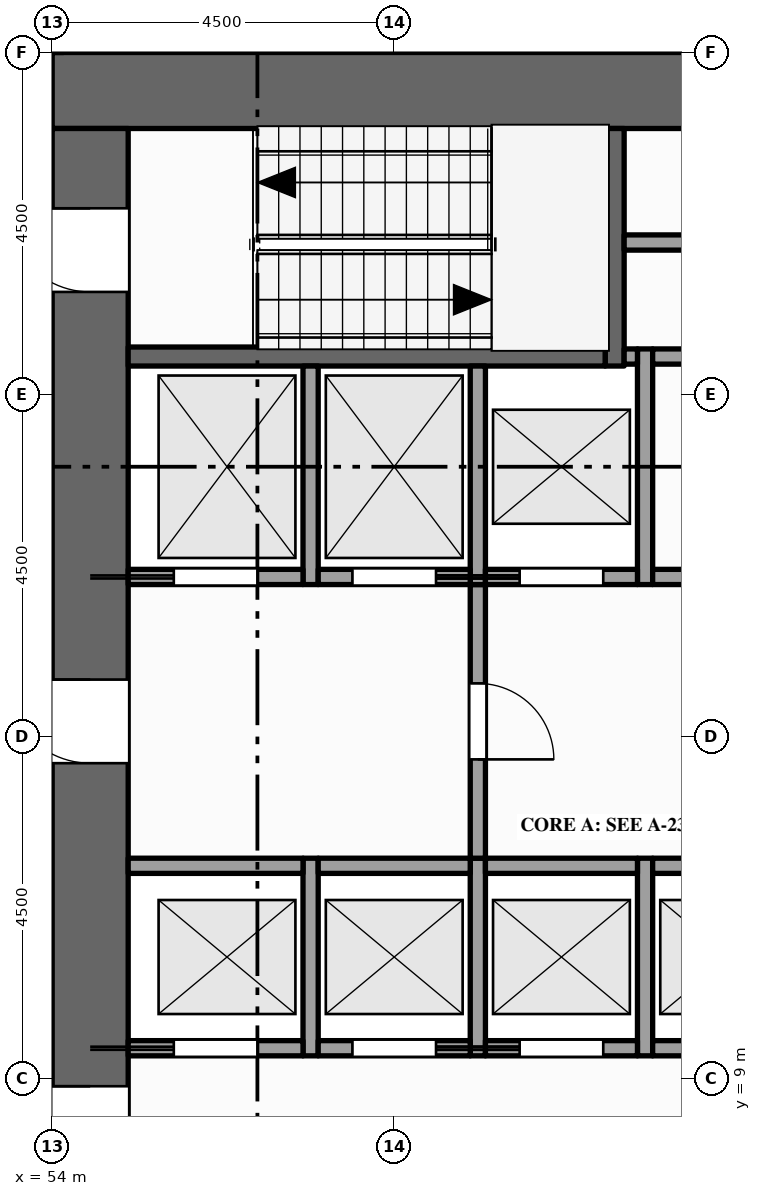
"""IFC4 building model, lengths in metres.
Left out: names, types, materials, properties, quantities, classifications, styles, units other than length and angle.
Written with IfcOpenShell. Run it as: python <this file> out.ifc"""

import sys

from ifc_helpers import new_model, si_unit, direction, frame, frame_2d, origin, place, context, subcontext, project, spatial, rectangle, extrude, element, fill, save


model = new_model("IFC4")
c1 = context("Model", 3, precision=1e-05, world=origin(), true_north=direction((0.0, 1.0)))
c2 = subcontext(c1, "Body", "Model", "MODEL_VIEW")
j1 = project(units=[si_unit("LENGTHUNIT", "METRE"), si_unit("PLANEANGLEUNIT", "RADIAN")], contexts=[c1])
p1 = place(None, origin())
s1 = spatial("IfcSite", under=j1, at=p1, CompositionType="ELEMENT")
p2 = place(p1, origin())
s2 = spatial("IfcBuilding", under=s1, at=p2, CompositionType="ELEMENT")
p3 = place(p2, frame((0.0, 0.0, 179.0)))
s3 = spatial("IfcBuildingStorey", under=s2, at=p3, CompositionType="ELEMENT", Elevation=179.0)
p4 = place(p3, frame((54.0, 22.0, -0.15), z_axis=(0.0, 0.0, 1.0), x_axis=(1.0, 0.0, 0.0)))
e1 = element("IfcWall", 1, at=p4, inside=s3, PredefinedType="SHEAR", context=c2, shape_type="SweptSolid", body=[
    extrude(rectangle(XDim=13.5, YDim=1.0, at=frame_2d((6.75, 0.0))), origin(), (0.0, 0.0, 1.0), 4.0),
])
p5 = place(p3, frame((54.5, 1.0, -0.15), z_axis=(0.0, 0.0, 1.0), x_axis=(0.0, 1.0, 0.0)))
e2 = element("IfcWall", 2, at=p5, inside=s3, PredefinedType="SHEAR", context=c2, shape_type="SweptSolid", body=[
    extrude(rectangle(XDim=20.5, YDim=1.0, at=frame_2d((10.25, 0.0))), origin(), (0.0, 0.0, 1.0), 4.0),
])
p6 = place(p5, frame((6.1, 0.0, 0.15)))
e3 = element("IfcOpeningElement", 3, at=p6, cuts=e2, PredefinedType="OPENING", context=c2, shape_type="SweptSolid", body=[
    extrude(rectangle(XDim=1.8, YDim=2.1, at=frame_2d((0.9, 1.05))), frame((0.0, 0.51, 0.0), z_axis=(0.0, -1.0, 0.0), x_axis=(1.0, 0.0, 0.0)), (0.0, 0.0, 1.0), 1.02),
])
p7 = place(p5, frame((12.15, 0.0, 0.15)))
e4 = element("IfcOpeningElement", 4, at=p7, cuts=e2, PredefinedType="OPENING", context=c2, shape_type="SweptSolid", body=[
    extrude(rectangle(XDim=1.1, YDim=2.1, at=frame_2d((0.55, 1.05))), frame((0.0, 0.51, 0.0), z_axis=(0.0, -1.0, 0.0), x_axis=(1.0, 0.0, 0.0)), (0.0, 0.0, 1.0), 1.02),
])
p8 = place(p5, frame((1.15, 0.0, 0.15)))
e5 = element("IfcOpeningElement", 5, at=p8, cuts=e2, PredefinedType="OPENING", context=c2, shape_type="SweptSolid", body=[
    extrude(rectangle(XDim=1.1, YDim=2.1, at=frame_2d((0.55, 1.05))), frame((0.0, 0.51, 0.0), z_axis=(0.0, -1.0, 0.0), x_axis=(1.0, 0.0, 0.0)), (0.0, 0.0, 1.0), 1.02),
])
p9 = place(p5, frame((18.35, 0.0, 0.15)))
e6 = element("IfcOpeningElement", 6, at=p9, cuts=e2, PredefinedType="OPENING", context=c2, shape_type="SweptSolid", body=[
    extrude(rectangle(XDim=1.1, YDim=2.1, at=frame_2d((0.55, 1.05))), frame((0.0, 0.51, 0.0), z_axis=(0.0, -1.0, 0.0), x_axis=(1.0, 0.0, 0.0)), (0.0, 0.0, 1.0), 1.02),
])
p10 = place(p3, frame((54.0, 22.5, 0.0), z_axis=(0.0, 0.0, 1.0), x_axis=(0.0, 1.0, 0.0)))
e7 = element("IfcWall", 7, at=p10, inside=s3, PredefinedType="STANDARD", context=c2, shape_type="SweptSolid", body=[
    extrude(rectangle(XDim=1.05, YDim=0.3, at=frame_2d((0.525, 0.0))), origin(), (0.0, 0.0, 1.0), 3.149),
])
p11 = place(p3, frame((57.4, 9.3, 0.0), z_axis=(0.0, 0.0, 1.0), x_axis=(0.0, 1.0, 0.0)))
e8 = element("IfcWall", 8, at=p11, inside=s3, PredefinedType="SOLIDWALL", context=c2, shape_type="SweptSolid", body=[
    extrude(rectangle(XDim=2.6, YDim=0.2, at=frame_2d((1.3, 0.0))), origin(), (0.0, 0.0, 1.0), 3.85),
])
p12 = place(p3, frame((57.4, 15.5, 0.0), z_axis=(0.0, 0.0, 1.0), x_axis=(0.0, 1.0, 0.0)))
e9 = element("IfcWall", 9, at=p12, inside=s3, PredefinedType="SOLIDWALL", context=c2, shape_type="SweptSolid", body=[
    extrude(rectangle(XDim=2.875, YDim=0.2, at=frame_2d((1.438, 0.0))), origin(), (0.0, 0.0, 1.0), 3.85),
])
p13 = place(p3, frame((59.6, 9.3, 0.0), z_axis=(0.0, 0.0, 1.0), x_axis=(0.0, 1.0, 0.0)))
e10 = element("IfcWall", 10, at=p13, inside=s3, PredefinedType="SOLIDWALL", context=c2, shape_type="SweptSolid", body=[
    extrude(rectangle(XDim=2.6, YDim=0.2, at=frame_2d((1.3, 0.0))), origin(), (0.0, 0.0, 1.0), 3.85),
])
p14 = place(p3, frame((59.6, 11.9, 0.0), z_axis=(0.0, 0.0, 1.0), x_axis=(0.0, 1.0, 0.0)))
e11 = element("IfcWall", 11, at=p14, inside=s3, PredefinedType="PARTITIONING", context=c2, shape_type="SweptSolid", body=[
    extrude(rectangle(XDim=3.6, YDim=0.2, at=frame_2d((1.8, 0.0))), origin(), (0.0, 0.0, 1.0), 3.85),
])
p15 = place(p14, frame((1.3, 0.0, 0.0)))
e12 = element("IfcOpeningElement", 12, at=p15, cuts=e11, PredefinedType="OPENING", context=c2, shape_type="SweptSolid", body=[
    extrude(rectangle(XDim=1.0, YDim=2.1, at=frame_2d((0.5, 1.05))), frame((0.0, 0.11, 0.0), z_axis=(0.0, -1.0, 0.0), x_axis=(1.0, 0.0, 0.0)), (0.0, 0.0, 1.0), 0.22),
])
p16 = place(p3, frame((59.6, 15.5, 0.0), z_axis=(0.0, 0.0, 1.0), x_axis=(0.0, 1.0, 0.0)))
e13 = element("IfcWall", 13, at=p16, inside=s3, PredefinedType="SOLIDWALL", context=c2, shape_type="SweptSolid", body=[
    extrude(rectangle(XDim=2.875, YDim=0.2, at=frame_2d((1.438, 0.0))), origin(), (0.0, 0.0, 1.0), 3.85),
])
p17 = place(p3, frame((61.4, 18.375, 0.0), z_axis=(0.0, 0.0, 1.0), x_axis=(0.0, 1.0, 0.0)))
e14 = element("IfcWall", 14, at=p17, inside=s3, PredefinedType="SHEAR", context=c2, shape_type="SweptSolid", body=[
    extrude(rectangle(XDim=3.125, YDim=0.25, at=frame_2d((1.562, 0.0))), origin(), (0.0, 0.0, 1.0), 3.85),
])
p18 = place(p3, frame((61.8, 9.3, 0.0), z_axis=(0.0, 0.0, 1.0), x_axis=(0.0, 1.0, 0.0)))
e15 = element("IfcWall", 15, at=p18, inside=s3, PredefinedType="SOLIDWALL", context=c2, shape_type="SweptSolid", body=[
    extrude(rectangle(XDim=2.6, YDim=0.2, at=frame_2d((1.3, 0.0))), origin(), (0.0, 0.0, 1.0), 3.85),
])
p19 = place(p3, frame((61.8, 15.5, 0.0), z_axis=(0.0, 0.0, 1.0), x_axis=(0.0, 1.0, 0.0)))
e16 = element("IfcWall", 16, at=p19, inside=s3, PredefinedType="SOLIDWALL", context=c2, shape_type="SweptSolid", body=[
    extrude(rectangle(XDim=3.1, YDim=0.2, at=frame_2d((1.55, 0.0))), origin(), (0.0, 0.0, 1.0), 3.85),
])
p20 = place(p3, frame((55.0, 9.4, 0.0), z_axis=(0.0, 0.0, 1.0), x_axis=(1.0, 0.0, 0.0)))
e17 = element("IfcWall", 17, at=p20, inside=s3, PredefinedType="SOLIDWALL", context=c2, shape_type="SweptSolid", body=[
    extrude(rectangle(XDim=2.3, YDim=0.2, at=frame_2d((1.15, 0.0))), origin(), (0.0, 0.0, 1.0), 3.85),
])
p21 = place(p20, frame((0.6, 0.0, 0.012)))
e18 = element("IfcOpeningElement", 18, at=p21, cuts=e17, PredefinedType="OPENING", context=c2, shape_type="SweptSolid", body=[
    extrude(rectangle(XDim=1.1, YDim=2.1, at=frame_2d((0.55, 1.05))), frame((0.0, 0.11, 0.0), z_axis=(0.0, -1.0, 0.0), x_axis=(1.0, 0.0, 0.0)), (0.0, 0.0, 1.0), 0.22),
])
p22 = place(p3, frame((57.5, 9.4, 0.0), z_axis=(0.0, 0.0, 1.0), x_axis=(1.0, 0.0, 0.0)))
e19 = element("IfcWall", 19, at=p22, inside=s3, PredefinedType="SOLIDWALL", context=c2, shape_type="SweptSolid", body=[
    extrude(rectangle(XDim=2.0, YDim=0.2, at=frame_2d((1.0, 0.0))), origin(), (0.0, 0.0, 1.0), 3.85),
])
p23 = place(p22, frame((0.45, 0.0, 0.012)))
e20 = element("IfcOpeningElement", 20, at=p23, cuts=e19, PredefinedType="OPENING", context=c2, shape_type="SweptSolid", body=[
    extrude(rectangle(XDim=1.1, YDim=2.1, at=frame_2d((0.55, 1.05))), frame((0.0, 0.11, 0.0), z_axis=(0.0, -1.0, 0.0), x_axis=(1.0, 0.0, 0.0)), (0.0, 0.0, 1.0), 0.22),
])
p24 = place(p3, frame((59.7, 9.4, 0.0), z_axis=(0.0, 0.0, 1.0), x_axis=(1.0, 0.0, 0.0)))
e21 = element("IfcWall", 21, at=p24, inside=s3, PredefinedType="SOLIDWALL", context=c2, shape_type="SweptSolid", body=[
    extrude(rectangle(XDim=2.0, YDim=0.2, at=frame_2d((1.0, 0.0))), origin(), (0.0, 0.0, 1.0), 3.85),
])
p25 = place(p24, frame((0.45, 0.0, 0.012)))
e22 = element("IfcOpeningElement", 22, at=p25, cuts=e21, PredefinedType="OPENING", context=c2, shape_type="SweptSolid", body=[
    extrude(rectangle(XDim=1.1, YDim=2.1, at=frame_2d((0.55, 1.05))), frame((0.0, 0.11, 0.0), z_axis=(0.0, -1.0, 0.0), x_axis=(1.0, 0.0, 0.0)), (0.0, 0.0, 1.0), 0.22),
])
p26 = place(p3, frame((61.9, 9.4, 0.0), z_axis=(0.0, 0.0, 1.0), x_axis=(1.0, 0.0, 0.0)))
e23 = element("IfcWall", 23, at=p26, inside=s3, PredefinedType="SOLIDWALL", context=c2, shape_type="SweptSolid", body=[
    extrude(rectangle(XDim=1.95, YDim=0.2, at=frame_2d((0.975, 0.0))), origin(), (0.0, 0.0, 1.0), 3.85),
])
p27 = place(p26, frame((0.425, 0.0, 0.012)))
e24 = element("IfcOpeningElement", 24, at=p27, cuts=e23, PredefinedType="OPENING", context=c2, shape_type="SweptSolid", body=[
    extrude(rectangle(XDim=1.1, YDim=2.1, at=frame_2d((0.55, 1.05))), frame((0.0, 0.11, 0.0), z_axis=(0.0, -1.0, 0.0), x_axis=(1.0, 0.0, 0.0)), (0.0, 0.0, 1.0), 0.22),
])
p28 = place(p3, frame((55.0, 11.8, 0.0), z_axis=(0.0, 0.0, 1.0), x_axis=(1.0, 0.0, 0.0)))
e25 = element("IfcWall", 25, at=p28, inside=s3, PredefinedType="SOLIDWALL", context=c2, shape_type="SweptSolid", body=[
    extrude(rectangle(XDim=2.3, YDim=0.2, at=frame_2d((1.15, 0.0))), origin(), (0.0, 0.0, 1.0), 3.85),
])
for number, where, z_axis, x_axis in (
    (26, (57.5, 11.8, 0.0), (0.0, 0.0, 1.0), (1.0, 0.0, 0.0)),
    (27, (59.7, 11.8, 0.0), (0.0, 0.0, 1.0), (1.0, 0.0, 0.0)),
):
    element("IfcWall", number, at=place(p3, frame(where, z_axis=z_axis, x_axis=x_axis)), inside=s3, PredefinedType="SOLIDWALL", context=c2, shape_type="SweptSolid", body=[
        extrude(rectangle(XDim=2.0, YDim=0.2, at=frame_2d((1.0, 0.0))), origin(), (0.0, 0.0, 1.0), 3.85),
    ])
p29 = place(p3, frame((61.9, 11.8, 0.0), z_axis=(0.0, 0.0, 1.0), x_axis=(1.0, 0.0, 0.0)))
e28 = element("IfcWall", 28, at=p29, inside=s3, PredefinedType="SOLIDWALL", context=c2, shape_type="SweptSolid", body=[
    extrude(rectangle(XDim=1.95, YDim=0.2, at=frame_2d((0.975, 0.0))), origin(), (0.0, 0.0, 1.0), 3.85),
])
p30 = place(p3, frame((55.0, 15.6, 0.0), z_axis=(0.0, 0.0, 1.0), x_axis=(1.0, 0.0, 0.0)))
e29 = element("IfcWall", 29, at=p30, inside=s3, PredefinedType="SOLIDWALL", context=c2, shape_type="SweptSolid", body=[
    extrude(rectangle(XDim=2.3, YDim=0.2, at=frame_2d((1.15, 0.0))), origin(), (0.0, 0.0, 1.0), 3.85),
])
p31 = place(p30, frame((0.6, 0.0, 0.012)))
e30 = element("IfcOpeningElement", 30, at=p31, cuts=e29, PredefinedType="OPENING", context=c2, shape_type="SweptSolid", body=[
    extrude(rectangle(XDim=1.1, YDim=2.1, at=frame_2d((0.55, 1.05))), frame((0.0, 0.11, 0.0), z_axis=(0.0, -1.0, 0.0), x_axis=(1.0, 0.0, 0.0)), (0.0, 0.0, 1.0), 0.22),
])
p32 = place(p3, frame((57.5, 15.6, 0.0), z_axis=(0.0, 0.0, 1.0), x_axis=(1.0, 0.0, 0.0)))
e31 = element("IfcWall", 31, at=p32, inside=s3, PredefinedType="SOLIDWALL", context=c2, shape_type="SweptSolid", body=[
    extrude(rectangle(XDim=2.0, YDim=0.2, at=frame_2d((1.0, 0.0))), origin(), (0.0, 0.0, 1.0), 3.85),
])
p33 = place(p32, frame((0.45, 0.0, 0.012)))
e32 = element("IfcOpeningElement", 32, at=p33, cuts=e31, PredefinedType="OPENING", context=c2, shape_type="SweptSolid", body=[
    extrude(rectangle(XDim=1.1, YDim=2.1, at=frame_2d((0.55, 1.05))), frame((0.0, 0.11, 0.0), z_axis=(0.0, -1.0, 0.0), x_axis=(1.0, 0.0, 0.0)), (0.0, 0.0, 1.0), 0.22),
])
p34 = place(p3, frame((59.7, 15.6, 0.0), z_axis=(0.0, 0.0, 1.0), x_axis=(1.0, 0.0, 0.0)))
e33 = element("IfcWall", 33, at=p34, inside=s3, PredefinedType="SOLIDWALL", context=c2, shape_type="SweptSolid", body=[
    extrude(rectangle(XDim=2.0, YDim=0.2, at=frame_2d((1.0, 0.0))), origin(), (0.0, 0.0, 1.0), 3.85),
])
p35 = place(p34, frame((0.45, 0.0, 0.012)))
e34 = element("IfcOpeningElement", 34, at=p35, cuts=e33, PredefinedType="OPENING", context=c2, shape_type="SweptSolid", body=[
    extrude(rectangle(XDim=1.1, YDim=2.1, at=frame_2d((0.55, 1.05))), frame((0.0, 0.11, 0.0), z_axis=(0.0, -1.0, 0.0), x_axis=(1.0, 0.0, 0.0)), (0.0, 0.0, 1.0), 0.22),
])
p36 = place(p3, frame((61.9, 15.6, 0.0), z_axis=(0.0, 0.0, 1.0), x_axis=(1.0, 0.0, 0.0)))
e35 = element("IfcWall", 35, at=p36, inside=s3, PredefinedType="PARTITIONING", context=c2, shape_type="SweptSolid", body=[
    extrude(rectangle(XDim=1.95, YDim=0.2, at=frame_2d((0.975, 0.0))), origin(), (0.0, 0.0, 1.0), 3.85),
])
p37 = place(p36, frame((0.525, 0.0, 0.0)))
e36 = element("IfcOpeningElement", 36, at=p37, cuts=e35, PredefinedType="OPENING", context=c2, shape_type="SweptSolid", body=[
    extrude(rectangle(XDim=0.9, YDim=2.1, at=frame_2d((0.45, 1.05))), frame((0.0, 0.11, 0.0), z_axis=(0.0, -1.0, 0.0), x_axis=(1.0, 0.0, 0.0)), (0.0, 0.0, 1.0), 0.22),
])
p38 = place(p3, frame((55.0, 18.5, 0.0), z_axis=(0.0, 0.0, 1.0), x_axis=(1.0, 0.0, 0.0)))
e37 = element("IfcWall", 37, at=p38, inside=s3, PredefinedType="SHEAR", context=c2, shape_type="SweptSolid", body=[
    extrude(rectangle(XDim=6.275, YDim=0.25, at=frame_2d((3.137, 0.0))), origin(), (0.0, 0.0, 1.0), 3.85),
])
p39 = place(p3, frame((61.525, 18.5, 0.0), z_axis=(0.0, 0.0, 1.0), x_axis=(1.0, 0.0, 0.0)))
e38 = element("IfcWall", 38, at=p39, inside=s3, PredefinedType="SOLIDWALL", context=c2, shape_type="SweptSolid", body=[
    extrude(rectangle(XDim=0.175, YDim=0.2, at=frame_2d((0.087, 0.0))), origin(), (0.0, 0.0, 1.0), 3.85),
])
p40 = place(p3, frame((61.9, 18.5, 0.0), z_axis=(0.0, 0.0, 1.0), x_axis=(1.0, 0.0, 0.0)))
e39 = element("IfcWall", 39, at=p40, inside=s3, PredefinedType="PARTITIONING", context=c2, shape_type="SweptSolid", body=[
    extrude(rectangle(XDim=1.95, YDim=0.2, at=frame_2d((0.975, 0.0))), origin(), (0.0, 0.0, 1.0), 3.85),
])
p41 = place(p3, frame((61.525, 20.0, 0.0), z_axis=(0.0, 0.0, 1.0), x_axis=(1.0, 0.0, 0.0)))
e40 = element("IfcWall", 40, at=p41, inside=s3, PredefinedType="PARTITIONING", context=c2, shape_type="SweptSolid", body=[
    extrude(rectangle(XDim=2.375, YDim=0.2, at=frame_2d((1.188, 0.0))), origin(), (0.0, 0.0, 1.0), 3.85),
])
p42 = place(p21, origin())
e41 = element("IfcDoor", 41, at=p42, inside=s3, OperationType="SLIDING_TO_LEFT", PredefinedType="DOOR", context=c2, shape_type="SweptSolid", body=[
    extrude(rectangle(XDim=1.1, YDim=2.1, at=frame_2d((0.55, 1.05))), frame((0.0, 0.025, 0.0), z_axis=(0.0, -1.0, 0.0), x_axis=(1.0, 0.0, 0.0)), (0.0, 0.0, 1.0), 0.05),
])
fill(e18, e41)
p43 = place(p23, origin())
e42 = element("IfcDoor", 42, at=p43, inside=s3, OperationType="SLIDING_TO_RIGHT", PredefinedType="DOOR", context=c2, shape_type="SweptSolid", body=[
    extrude(rectangle(XDim=1.1, YDim=2.1, at=frame_2d((0.55, 1.05))), frame((0.0, 0.025, 0.0), z_axis=(0.0, -1.0, 0.0), x_axis=(1.0, 0.0, 0.0)), (0.0, 0.0, 1.0), 0.05),
])
fill(e20, e42)
p44 = place(p25, origin())
e43 = element("IfcDoor", 43, at=p44, inside=s3, OperationType="SLIDING_TO_LEFT", PredefinedType="DOOR", context=c2, shape_type="SweptSolid", body=[
    extrude(rectangle(XDim=1.1, YDim=2.1, at=frame_2d((0.55, 1.05))), frame((0.0, 0.025, 0.0), z_axis=(0.0, -1.0, 0.0), x_axis=(1.0, 0.0, 0.0)), (0.0, 0.0, 1.0), 0.05),
])
fill(e22, e43)
p45 = place(p31, origin())
e44 = element("IfcDoor", 44, at=p45, inside=s3, OperationType="SLIDING_TO_LEFT", PredefinedType="DOOR", context=c2, shape_type="SweptSolid", body=[
    extrude(rectangle(XDim=1.1, YDim=2.1, at=frame_2d((0.55, 1.05))), frame((0.0, 0.025, 0.0), z_axis=(0.0, -1.0, 0.0), x_axis=(1.0, 0.0, 0.0)), (0.0, 0.0, 1.0), 0.05),
])
fill(e30, e44)
p46 = place(p33, origin())
e45 = element("IfcDoor", 45, at=p46, inside=s3, OperationType="SLIDING_TO_RIGHT", PredefinedType="DOOR", context=c2, shape_type="SweptSolid", body=[
    extrude(rectangle(XDim=1.1, YDim=2.1, at=frame_2d((0.55, 1.05))), frame((0.0, 0.025, 0.0), z_axis=(0.0, -1.0, 0.0), x_axis=(1.0, 0.0, 0.0)), (0.0, 0.0, 1.0), 0.05),
])
fill(e32, e45)
p47 = place(p35, origin())
e46 = element("IfcDoor", 46, at=p47, inside=s3, OperationType="SLIDING_TO_LEFT", PredefinedType="DOOR", context=c2, shape_type="SweptSolid", body=[
    extrude(rectangle(XDim=1.1, YDim=2.1, at=frame_2d((0.55, 1.05))), frame((0.0, 0.025, 0.0), z_axis=(0.0, -1.0, 0.0), x_axis=(1.0, 0.0, 0.0)), (0.0, 0.0, 1.0), 0.05),
])
fill(e34, e46)
p48 = place(p6, origin())
e47 = element("IfcDoor", 47, at=p48, inside=s3, OperationType="DOUBLE_DOOR_SINGLE_SWING", PredefinedType="DOOR", context=c2, shape_type="SweptSolid", body=[
    extrude(rectangle(XDim=1.8, YDim=2.1, at=frame_2d((0.9, 1.05))), frame((0.0, 0.025, 0.0), z_axis=(0.0, -1.0, 0.0), x_axis=(1.0, 0.0, 0.0)), (0.0, 0.0, 1.0), 0.05),
])
fill(e3, e47)
p49 = place(p7, origin())
e48 = element("IfcDoor", 48, at=p49, inside=s3, OperationType="SINGLE_SWING_RIGHT", PredefinedType="DOOR", context=c2, shape_type="SweptSolid", body=[
    extrude(rectangle(XDim=1.1, YDim=2.1, at=frame_2d((0.55, 1.05))), frame((0.0, 0.025, 0.0), z_axis=(0.0, -1.0, 0.0), x_axis=(1.0, 0.0, 0.0)), (0.0, 0.0, 1.0), 0.05),
])
fill(e4, e48)
p50 = place(p15, origin())
e49 = element("IfcDoor", 49, at=p50, inside=s3, OperationType="SINGLE_SWING_LEFT", PredefinedType="DOOR", context=c2, shape_type="SweptSolid", body=[
    extrude(rectangle(XDim=1.0, YDim=2.1, at=frame_2d((0.5, 1.05))), frame((0.0, 0.025, 0.0), z_axis=(0.0, -1.0, 0.0), x_axis=(1.0, 0.0, 0.0)), (0.0, 0.0, 1.0), 0.05),
])
fill(e12, e49)
p51 = place(p9, origin())
e50 = element("IfcDoor", 50, at=p51, inside=s3, OperationType="SINGLE_SWING_RIGHT", PredefinedType="DOOR", context=c2, shape_type="SweptSolid", body=[
    extrude(rectangle(XDim=1.1, YDim=2.1, at=frame_2d((0.55, 1.05))), frame((0.0, 0.025, 0.0), z_axis=(0.0, -1.0, 0.0), x_axis=(1.0, 0.0, 0.0)), (0.0, 0.0, 1.0), 0.05),
])
fill(e6, e50)
save(model, sys.argv[1])
